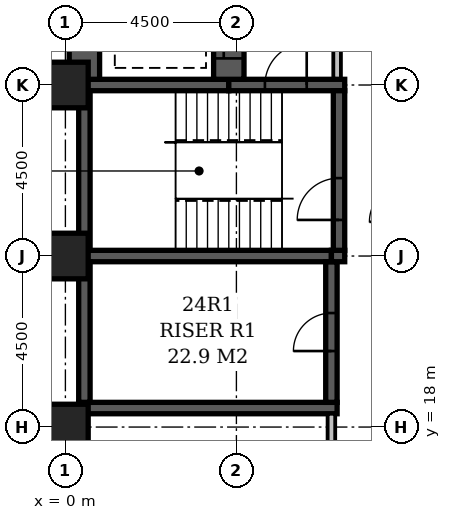
"""IFC4 building model, lengths in metres.
Left out: names, types, materials, properties, quantities, classifications, styles, units other than length and angle.
Written with IfcOpenShell. Run it as: python <this file> out.ifc"""

import sys

from ifc_helpers import new_model, si_unit, direction, frame, frame_2d, origin, origin_2d, place, context, subcontext, project, spatial, rectangle, extrude, element, fill, save


model = new_model("IFC4")
c1 = context("Model", 3, precision=1e-05, world=origin(), true_north=direction((0.0, 1.0)))
c2 = subcontext(c1, "Body", "Model", "MODEL_VIEW")
j1 = project(units=[si_unit("LENGTHUNIT", "METRE"), si_unit("PLANEANGLEUNIT", "RADIAN")], contexts=[c1])
p1 = place(None, origin())
s1 = spatial("IfcSite", under=j1, at=p1, CompositionType="ELEMENT")
p2 = place(p1, origin())
s2 = spatial("IfcBuilding", under=s1, at=p2, CompositionType="ELEMENT")
p3 = place(p2, frame((0.0, 0.0, 97.4)))
s3 = spatial("IfcBuildingStorey", under=s2, at=p3, CompositionType="ELEMENT", Elevation=97.4)
p4 = place(p3, frame((0.35, 18.5, -0.3), z_axis=(0.0, 0.0, 1.0), x_axis=(1.0, 0.0, 0.0)))
e1 = element("IfcWall", 1, at=p4, inside=s3, PredefinedType="SHEAR", context=c2, shape_type="SweptSolid", body=[
    extrude(rectangle(XDim=6.8, YDim=0.3, at=frame_2d((3.4, 0.0))), origin(), (0.0, 0.0, 1.0), 3.6),
])
p5 = place(p3, frame((0.35, 22.5, -0.3), z_axis=(0.0, 0.0, 1.0), x_axis=(1.0, 0.0, 0.0)))
e2 = element("IfcWall", 2, at=p5, inside=s3, PredefinedType="SHEAR", context=c2, shape_type="SweptSolid", body=[
    extrude(rectangle(XDim=6.65, YDim=0.3, at=frame_2d((3.325, 0.0))), origin(), (0.0, 0.0, 1.0), 3.6),
])
p6 = place(p3, frame((0.35, 27.0, -0.3), z_axis=(0.0, 0.0, 1.0), x_axis=(1.0, 0.0, 0.0)))
e3 = element("IfcWall", 3, at=p6, inside=s3, PredefinedType="SHEAR", context=c2, shape_type="SweptSolid", body=[
    extrude(rectangle(XDim=3.95, YDim=0.3, at=frame_2d((1.975, 0.0))), origin(), (0.0, 0.0, 1.0), 3.6),
])
p7 = place(p3, frame((0.5, 18.65, -0.3), z_axis=(0.0, 0.0, 1.0), x_axis=(0.0, 1.0, 0.0)))
e4 = element("IfcWall", 4, at=p7, inside=s3, PredefinedType="SHEAR", context=c2, shape_type="SweptSolid", body=[
    extrude(rectangle(XDim=3.7, YDim=0.3, at=frame_2d((1.85, 0.0))), origin(), (0.0, 0.0, 1.0), 3.6),
])
p8 = place(p3, frame((0.5, 22.65, -0.3), z_axis=(0.0, 0.0, 1.0), x_axis=(0.0, 1.0, 0.0)))
e5 = element("IfcWall", 5, at=p8, inside=s3, PredefinedType="SHEAR", context=c2, shape_type="SweptSolid", body=[
    extrude(rectangle(XDim=4.2, YDim=0.3, at=frame_2d((2.1, 0.0))), origin(), (0.0, 0.0, 1.0), 3.6),
])
p9 = place(p3, frame((0.5, 27.15, -0.3), z_axis=(0.0, 0.0, 1.0), x_axis=(0.0, 1.0, 0.0)))
e6 = element("IfcWall", 6, at=p9, inside=s3, PredefinedType="SHEAR", context=c2, shape_type="SweptSolid", body=[
    extrude(rectangle(XDim=6.95, YDim=0.8, at=frame_2d((3.475, 0.0))), origin(), (0.0, 0.0, 1.0), 3.6),
])
p10 = place(p3, frame((4.3, 27.0, -0.3), z_axis=(0.0, 0.0, 1.0), x_axis=(1.0, 0.0, 0.0)))
e7 = element("IfcWall", 7, at=p10, inside=s3, PredefinedType="SHEAR", context=c2, shape_type="SweptSolid", body=[
    extrude(rectangle(XDim=3.05, YDim=0.3, at=frame_2d((1.525, 0.0))), origin(), (0.0, 0.0, 1.0), 3.6),
])
p11 = place(p10, frame((0.95, 0.0, 0.3)))
e8 = element("IfcOpeningElement", 8, at=p11, cuts=e7, PredefinedType="OPENING", context=c2, shape_type="SweptSolid", body=[
    extrude(rectangle(XDim=1.1, YDim=2.1, at=frame_2d((0.55, 1.05))), frame((0.0, 0.162, 0.0), z_axis=(0.0, -1.0, 0.0), x_axis=(1.0, 0.0, 0.0)), (0.0, 0.0, 1.0), 0.324),
])
p12 = place(p3, frame((4.3, 27.15, -0.3), z_axis=(0.0, 0.0, 1.0), x_axis=(0.0, 1.0, 0.0)))
e9 = element("IfcWall", 9, at=p12, inside=s3, PredefinedType="SHEAR", context=c2, shape_type="SweptSolid", body=[
    extrude(rectangle(XDim=6.95, YDim=0.8, at=frame_2d((3.475, 0.0))), origin(), (0.0, 0.0, 1.0), 3.6),
])
p13 = place(p12, frame((3.05, 0.0, 0.3)))
e10 = element("IfcOpeningElement", 10, at=p13, cuts=e9, PredefinedType="OPENING", context=c2, shape_type="SweptSolid", body=[
    extrude(rectangle(XDim=1.1, YDim=2.1, at=frame_2d((0.55, 1.05))), frame((0.0, 0.412, 0.0), z_axis=(0.0, -1.0, 0.0), x_axis=(1.0, 0.0, 0.0)), (0.0, 0.0, 1.0), 0.824),
])
p14 = place(p12, frame((0.55, 0.0, 0.3)))
e11 = element("IfcOpeningElement", 11, at=p14, cuts=e9, PredefinedType="OPENING", context=c2, shape_type="SweptSolid", body=[
    extrude(rectangle(XDim=1.1, YDim=2.1, at=frame_2d((0.55, 1.05))), frame((0.0, 0.412, 0.0), z_axis=(0.0, -1.0, 0.0), x_axis=(1.0, 0.0, 0.0)), (0.0, 0.0, 1.0), 0.824),
])
p15 = place(p12, frame((5.35, 0.0, 0.3)))
e12 = element("IfcOpeningElement", 12, at=p15, cuts=e9, PredefinedType="OPENING", context=c2, shape_type="SweptSolid", body=[
    extrude(rectangle(XDim=1.1, YDim=2.1, at=frame_2d((0.55, 1.05))), frame((0.0, 0.412, 0.0), z_axis=(0.0, -1.0, 0.0), x_axis=(1.0, 0.0, 0.0)), (0.0, 0.0, 1.0), 0.824),
])
p16 = place(p3, frame((7.0, 18.65, -0.3), z_axis=(0.0, 0.0, 1.0), x_axis=(0.0, 1.0, 0.0)))
e13 = element("IfcWall", 13, at=p16, inside=s3, PredefinedType="SHEAR", context=c2, shape_type="SweptSolid", body=[
    extrude(rectangle(XDim=3.7, YDim=0.3, at=frame_2d((1.85, 0.0))), origin(), (0.0, 0.0, 1.0), 3.6),
])
p17 = place(p16, frame((1.35, 0.0, 0.3)))
e14 = element("IfcOpeningElement", 14, at=p17, cuts=e13, PredefinedType="OPENING", context=c2, shape_type="SweptSolid", body=[
    extrude(rectangle(XDim=1.0, YDim=2.1, at=frame_2d((0.5, 1.05))), frame((0.0, 0.162, 0.0), z_axis=(0.0, -1.0, 0.0), x_axis=(1.0, 0.0, 0.0)), (0.0, 0.0, 1.0), 0.324),
])
p18 = place(p3, frame((7.0, 22.5, -0.3), z_axis=(0.0, 0.0, 1.0), x_axis=(1.0, 0.0, 0.0)))
e15 = element("IfcWall", 15, at=p18, inside=s3, PredefinedType="SHEAR", context=c2, shape_type="SweptSolid", body=[
    extrude(rectangle(XDim=0.35, YDim=0.3, at=frame_2d((0.175, 0.0))), origin(), (0.0, 0.0, 1.0), 3.6),
])
p19 = place(p3, frame((7.2, 22.65, -0.3), z_axis=(0.0, 0.0, 1.0), x_axis=(0.0, 1.0, 0.0)))
e16 = element("IfcWall", 16, at=p19, inside=s3, PredefinedType="SHEAR", context=c2, shape_type="SweptSolid", body=[
    extrude(rectangle(XDim=4.2, YDim=0.3, at=frame_2d((2.1, 0.0))), origin(), (0.0, 0.0, 1.0), 3.6),
])
p20 = place(p19, frame((0.8, 0.0, 0.3)))
e17 = element("IfcOpeningElement", 17, at=p20, cuts=e16, PredefinedType="OPENING", context=c2, shape_type="SweptSolid", body=[
    extrude(rectangle(XDim=1.1, YDim=2.1, at=frame_2d((0.55, 1.05))), frame((0.0, 0.162, 0.0), z_axis=(0.0, -1.0, 0.0), x_axis=(1.0, 0.0, 0.0)), (0.0, 0.0, 1.0), 0.324),
])
for number, where, z_axis, x_axis in (
    (18, (0.0, 18.0, -0.3), (0.0, 0.0, 1.0), (1.0, 0.0, 0.0)),
    (19, (0.0, 22.5, -0.3), (0.0, 0.0, 1.0), (1.0, 0.0, 0.0)),
    (20, (0.0, 27.0, -0.3), (0.0, 0.0, 1.0), (1.0, 0.0, 0.0)),
):
    element("IfcColumn", number, at=place(p3, frame(where, z_axis=z_axis, x_axis=x_axis)), inside=s3, PredefinedType="COLUMN", context=c2, shape_type="SweptSolid", body=[
        extrude(rectangle(XDim=1.2, YDim=1.2, at=origin_2d()), origin(), (0.0, 0.0, 1.0), 3.6),
    ])
p21 = place(p3, frame((7.15, 27.17, 0.0), z_axis=(0.0, 0.0, 1.0), x_axis=(0.0, 1.0, 0.0)))
e21 = element("IfcWall", 21, at=p21, inside=s3, PredefinedType="PARTITIONING", context=c2, shape_type="SweptSolid", body=[
    extrude(rectangle(XDim=4.83, YDim=0.2, at=frame_2d((2.415, 0.0))), origin(), (0.0, 0.0, 1.0), 3.3),
])
p22 = place(p21, frame((1.73, 0.0, 0.0)))
e22 = element("IfcOpeningElement", 22, at=p22, cuts=e21, PredefinedType="OPENING", context=c2, shape_type="SweptSolid", body=[
    extrude(rectangle(XDim=1.2, YDim=2.1, at=frame_2d((0.6, 1.05))), frame((0.0, 0.112, 0.0), z_axis=(0.0, -1.0, 0.0), x_axis=(1.0, 0.0, 0.0)), (0.0, 0.0, 1.0), 0.224),
])
p23 = place(p3, frame((7.0, 14.15, 0.0), z_axis=(0.0, 0.0, 1.0), x_axis=(0.0, 1.0, 0.0)))
e23 = element("IfcWall", 23, at=p23, inside=s3, PredefinedType="PARTITIONING", context=c2, shape_type="SweptSolid", body=[
    extrude(rectangle(XDim=4.2, YDim=0.2, at=frame_2d((2.1, 0.0))), origin(), (0.0, 0.0, 1.0), 3.3),
])
p24 = place(p23, frame((1.65, 0.0, 0.0)))
e24 = element("IfcOpeningElement", 24, at=p24, cuts=e23, PredefinedType="OPENING", context=c2, shape_type="SweptSolid", body=[
    extrude(rectangle(XDim=0.9, YDim=2.1, at=frame_2d((0.45, 1.05))), frame((0.0, 0.112, 0.0), z_axis=(0.0, -1.0, 0.0), x_axis=(1.0, 0.0, 0.0)), (0.0, 0.0, 1.0), 0.224),
])
p25 = place(p14, origin())
e25 = element("IfcDoor", 25, at=p25, inside=s3, OperationType="SLIDING_TO_LEFT", PredefinedType="DOOR", context=c2, shape_type="SweptSolid", body=[
    extrude(rectangle(XDim=1.1, YDim=2.1, at=frame_2d((0.55, 1.05))), frame((0.0, 0.025, 0.0), z_axis=(0.0, -1.0, 0.0), x_axis=(1.0, 0.0, 0.0)), (0.0, 0.0, 1.0), 0.05),
])
fill(e11, e25)
p26 = place(p17, origin())
e26 = element("IfcDoor", 26, at=p26, inside=s3, OperationType="SINGLE_SWING_LEFT", PredefinedType="DOOR", context=c2, shape_type="SweptSolid", body=[
    extrude(rectangle(XDim=1.0, YDim=2.1, at=frame_2d((0.5, 1.05))), frame((0.0, 0.025, 0.0), z_axis=(0.0, -1.0, 0.0), x_axis=(1.0, 0.0, 0.0)), (0.0, 0.0, 1.0), 0.05),
])
fill(e14, e26)
p27 = place(p11, frame((1.1, 0.0, 0.0), z_axis=(0.0, 0.0, 1.0), x_axis=(-1.0, 0.0, 0.0)))
e27 = element("IfcDoor", 27, at=p27, inside=s3, OperationType="SINGLE_SWING_LEFT", PredefinedType="DOOR", context=c2, shape_type="SweptSolid", body=[
    extrude(rectangle(XDim=1.1, YDim=2.1, at=frame_2d((0.55, 1.05))), frame((0.0, 0.025, 0.0), z_axis=(0.0, -1.0, 0.0), x_axis=(1.0, 0.0, 0.0)), (0.0, 0.0, 1.0), 0.05),
])
fill(e8, e27)
p28 = place(p20, origin())
e28 = element("IfcDoor", 28, at=p28, inside=s3, OperationType="SINGLE_SWING_LEFT", PredefinedType="DOOR", context=c2, shape_type="SweptSolid", body=[
    extrude(rectangle(XDim=1.1, YDim=2.1, at=frame_2d((0.55, 1.05))), frame((0.0, 0.025, 0.0), z_axis=(0.0, -1.0, 0.0), x_axis=(1.0, 0.0, 0.0)), (0.0, 0.0, 1.0), 0.05),
])
fill(e17, e28)
save(model, sys.argv[1])
